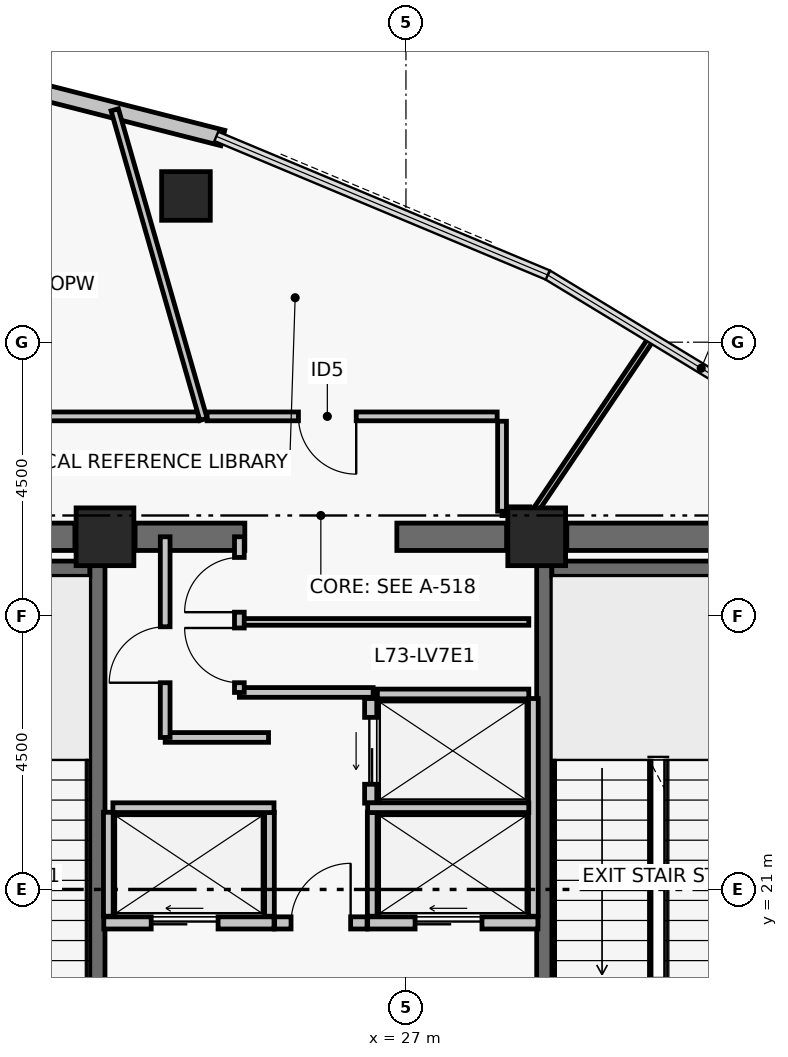
"""IFC4 building model, lengths in metres.
Left out: names, types, materials, properties, quantities, classifications, styles, units other than length and angle.
Written with IfcOpenShell. Run it as: python <this file> out.ifc"""

import sys

from ifc_helpers import new_model, si_unit, direction, frame, frame_2d, origin, origin_2d, place, context, subcontext, project, spatial, rectangle, hollow_rectangle, extrude, element, fill, save


model = new_model("IFC4")
c1 = context("Model", 3, precision=1e-05, world=origin(), true_north=direction((0.0, 1.0)))
c2 = subcontext(c1, "Body", "Model", "MODEL_VIEW")
j1 = project(units=[si_unit("LENGTHUNIT", "METRE"), si_unit("PLANEANGLEUNIT", "RADIAN")], contexts=[c1])
p1 = place(None, origin())
s1 = spatial("IfcSite", under=j1, at=p1, CompositionType="ELEMENT")
p2 = place(p1, origin())
s2 = spatial("IfcBuilding", under=s1, at=p2, CompositionType="ELEMENT")
p3 = place(p2, frame((0.0, 0.0, 288.06)))
s3 = spatial("IfcBuildingStorey", under=s2, at=p3, CompositionType="ELEMENT", Elevation=288.06)
for number, where, z_axis, x_axis in (
    (1, (22.05, 26.8, 0.0), (0.0, 0.0, 1.0), (1.0, 0.0, 0.0)),
    (2, (29.15, 26.8, 0.0), (0.0, 0.0, 1.0), (1.0, 0.0, 0.0)),
):
    element("IfcColumn", number, at=place(p3, frame(where, z_axis=z_axis, x_axis=x_axis)), inside=s3, PredefinedType="COLUMN", context=c2, shape_type="SweptSolid", body=[
        extrude(rectangle(XDim=0.95, YDim=0.95, at=origin_2d()), origin(), (0.0, 0.0, 1.0), 3.72),
    ])
p4 = place(p3, frame((18.295, 26.8, 0.0), z_axis=(0.0, 0.0, 1.0), x_axis=(1.0, 0.0, 0.0)))
e3 = element("IfcWall", 3, at=p4, inside=s3, PredefinedType="SHEAR", context=c2, shape_type="SweptSolid", body=[
    extrude(rectangle(XDim=3.26, YDim=0.45, at=frame_2d((1.63, 0.0))), origin(), (0.0, 0.0, 1.0), 3.5),
])
p5 = place(p3, frame((22.545, 26.8, 0.0), z_axis=(0.0, 0.0, 1.0), x_axis=(1.0, 0.0, 0.0)))
e4 = element("IfcWall", 4, at=p5, inside=s3, PredefinedType="SHEAR", context=c2, shape_type="SweptSolid", body=[
    extrude(rectangle(XDim=1.805, YDim=0.45, at=frame_2d((0.903, 0.0))), origin(), (0.0, 0.0, 1.0), 3.5),
])
p6 = place(p3, frame((26.85, 26.8, 0.0), z_axis=(0.0, 0.0, 1.0), x_axis=(1.0, 0.0, 0.0)))
e5 = element("IfcWall", 5, at=p6, inside=s3, PredefinedType="SHEAR", context=c2, shape_type="SweptSolid", body=[
    extrude(rectangle(XDim=1.805, YDim=0.45, at=frame_2d((0.902, 0.0))), origin(), (0.0, 0.0, 1.0), 3.5),
])
p7 = place(p3, frame((29.645, 26.8, 0.0), z_axis=(0.0, 0.0, 1.0), x_axis=(1.0, 0.0, 0.0)))
e6 = element("IfcWall", 6, at=p7, inside=s3, PredefinedType="SHEAR", context=c2, shape_type="SweptSolid", body=[
    extrude(rectangle(XDim=3.26, YDim=0.45, at=frame_2d((1.63, 0.0))), origin(), (0.0, 0.0, 1.0), 3.5),
])
p8 = place(p3, frame((21.925, 17.6, 0.0), z_axis=(0.0, 0.0, 1.0), x_axis=(0.0, 1.0, 0.0)))
e7 = element("IfcWall", 7, at=p8, inside=s3, PredefinedType="SHEAR", context=c2, shape_type="SweptSolid", body=[
    extrude(rectangle(XDim=8.8, YDim=0.25, at=frame_2d((4.4, 0.0))), origin(), (0.0, 0.0, 1.0), 3.5),
])
p9 = place(p8, frame((0.35, 0.0, 0.0)))
e8 = element("IfcOpeningElement", 8, at=p9, cuts=e7, PredefinedType="OPENING", context=c2, shape_type="SweptSolid", body=[
    extrude(rectangle(XDim=1.05, YDim=2.08, at=frame_2d((0.525, 1.04))), frame((0.0, 0.135, 0.0), z_axis=(0.0, -1.0, 0.0), x_axis=(1.0, 0.0, 0.0)), (0.0, 0.0, 1.0), 0.27),
])
p10 = place(p3, frame((18.3, 26.275, 0.0), z_axis=(0.0, 0.0, 1.0), x_axis=(1.0, 0.0, 0.0)))
e9 = element("IfcWall", 9, at=p10, inside=s3, PredefinedType="SHEAR", context=c2, shape_type="SweptSolid", body=[
    extrude(rectangle(XDim=3.5, YDim=0.25, at=frame_2d((1.75, 0.0))), origin(), (0.0, 0.0, 1.0), 3.5),
])
p11 = place(p3, frame((29.275, 17.6, 0.0), z_axis=(0.0, 0.0, 1.0), x_axis=(0.0, 1.0, 0.0)))
e10 = element("IfcWall", 10, at=p11, inside=s3, PredefinedType="SHEAR", context=c2, shape_type="SweptSolid", body=[
    extrude(rectangle(XDim=8.8, YDim=0.25, at=frame_2d((4.4, 0.0))), origin(), (0.0, 0.0, 1.0), 3.5),
])
p12 = place(p11, frame((0.35, 0.0, 0.0)))
e11 = element("IfcOpeningElement", 11, at=p12, cuts=e10, PredefinedType="OPENING", context=c2, shape_type="SweptSolid", body=[
    extrude(rectangle(XDim=1.05, YDim=2.08, at=frame_2d((0.525, 1.04))), frame((0.0, 0.135, 0.0), z_axis=(0.0, -1.0, 0.0), x_axis=(1.0, 0.0, 0.0)), (0.0, 0.0, 1.0), 0.27),
])
p13 = place(p3, frame((29.4, 26.275, 0.0), z_axis=(0.0, 0.0, 1.0), x_axis=(1.0, 0.0, 0.0)))
e12 = element("IfcWall", 12, at=p13, inside=s3, PredefinedType="SHEAR", context=c2, shape_type="SweptSolid", body=[
    extrude(rectangle(XDim=3.5, YDim=0.25, at=frame_2d((1.75, 0.0))), origin(), (0.0, 0.0, 1.0), 3.5),
])
p14 = place(p3, frame((23.382, 32.405, 0.0), z_axis=(0.0, 0.0, 1.0), x_axis=(1.0, 0.0, 0.0)))
e13 = element("IfcColumn", 13, at=p14, inside=s3, PredefinedType="COLUMN", context=c2, shape_type="SweptSolid", body=[
    extrude(hollow_rectangle(XDim=0.8, YDim=0.8, WallThickness=0.035, at=origin_2d()), origin(), (0.0, 0.0, 1.0), 3.72),
])
p15 = place(p3, frame((18.024, 34.879, 0.0), z_axis=(0.0, 0.0, 1.0), x_axis=(0.968988278672, -0.247106689096, 0.0)))
e14 = element("IfcWall", 14, at=p15, inside=s3, PredefinedType="PARTITIONING", context=c2, shape_type="SweptSolid", body=[
    extrude(rectangle(XDim=6.154, YDim=0.26, at=frame_2d((3.077, 0.0))), origin(), (0.0, 0.0, 1.0), 3.5),
])
p16 = place(p3, frame((24.84, 20.45, 0.0), z_axis=(0.0, 0.0, 1.0), x_axis=(1.0, 0.0, 0.0)))
e15 = element("IfcWall", 15, at=p16, inside=s3, PredefinedType="PARTITIONING", context=c2, shape_type="SweptSolid", body=[
    extrude(rectangle(XDim=1.52, YDim=0.2, at=frame_2d((0.76, 0.0))), origin(), (0.0, 0.0, 1.0), 3.5),
])
p17 = place(p16, frame((0.27, 0.0, 0.0)))
e16 = element("IfcOpeningElement", 16, at=p17, cuts=e15, PredefinedType="OPENING", context=c2, shape_type="SweptSolid", body=[
    extrude(rectangle(XDim=0.98, YDim=2.06, at=frame_2d((0.49, 1.03))), frame((0.0, 0.11, 0.0), z_axis=(0.0, -1.0, 0.0), x_axis=(1.0, 0.0, 0.0)), (0.0, 0.0, 1.0), 0.22),
])
p18 = place(p3, frame((22.03, 20.45, 0.0), z_axis=(0.0, 0.0, 1.0), x_axis=(1.0, 0.0, 0.0)))
e17 = element("IfcWall", 17, at=p18, inside=s3, PredefinedType="PARTITIONING", context=c2, shape_type="SweptSolid", body=[
    extrude(rectangle(XDim=2.8, YDim=0.2, at=frame_2d((1.4, 0.0))), origin(), (0.0, 0.0, 1.0), 3.5),
])
p19 = place(p18, frame((0.78, 0.0, 0.0)))
e18 = element("IfcOpeningElement", 18, at=p19, cuts=e17, PredefinedType="OPENING", context=c2, shape_type="SweptSolid", body=[
    extrude(rectangle(XDim=1.1, YDim=2.08, at=frame_2d((0.55, 1.04))), frame((0.0, 0.11, 0.0), z_axis=(0.0, -1.0, 0.0), x_axis=(1.0, 0.0, 0.0)), (0.0, 0.0, 1.0), 0.22),
])
p20 = place(p3, frame((26.37, 20.45, 0.0), z_axis=(0.0, 0.0, 1.0), x_axis=(1.0, 0.0, 0.0)))
e19 = element("IfcWall", 19, at=p20, inside=s3, PredefinedType="PARTITIONING", context=c2, shape_type="SweptSolid", body=[
    extrude(rectangle(XDim=2.8, YDim=0.2, at=frame_2d((1.4, 0.0))), origin(), (0.0, 0.0, 1.0), 3.5),
])
p21 = place(p20, frame((0.78, 0.0, 0.0)))
e20 = element("IfcOpeningElement", 20, at=p21, cuts=e19, PredefinedType="OPENING", context=c2, shape_type="SweptSolid", body=[
    extrude(rectangle(XDim=1.1, YDim=2.08, at=frame_2d((0.55, 1.04))), frame((0.0, 0.11, 0.0), z_axis=(0.0, -1.0, 0.0), x_axis=(1.0, 0.0, 0.0)), (0.0, 0.0, 1.0), 0.22),
])
p22 = place(p3, frame((26.42, 22.42, 0.0), z_axis=(0.0, 0.0, 1.0), x_axis=(0.0, 1.0, 0.0)))
e21 = element("IfcWall", 21, at=p22, inside=s3, PredefinedType="PARTITIONING", context=c2, shape_type="SweptSolid", body=[
    extrude(rectangle(XDim=1.72, YDim=0.2, at=frame_2d((0.86, 0.0))), origin(), (0.0, 0.0, 1.0), 3.5),
])
p23 = place(p22, frame((0.31, 0.0, 0.0)))
e22 = element("IfcOpeningElement", 22, at=p23, cuts=e21, PredefinedType="OPENING", context=c2, shape_type="SweptSolid", body=[
    extrude(rectangle(XDim=1.1, YDim=2.08, at=frame_2d((0.55, 1.04))), frame((0.0, 0.11, 0.0), z_axis=(0.0, -1.0, 0.0), x_axis=(1.0, 0.0, 0.0)), (0.0, 0.0, 1.0), 0.22),
])
for number, where, z_axis, x_axis in (
    (23, (22.105, 20.56, 0.0), (0.0, 0.0, 1.0), (0.0, 1.0, 0.0)),
    (24, (24.755, 20.56, 0.0), (0.0, 0.0, 1.0), (0.0, 1.0, 0.0)),
):
    element("IfcWall", number, at=place(p3, frame(where, z_axis=z_axis, x_axis=x_axis)), inside=s3, PredefinedType="PARTITIONING", context=c2, shape_type="SweptSolid", body=[
        extrude(rectangle(XDim=1.71, YDim=0.16, at=frame_2d((0.855, 0.0))), origin(), (0.0, 0.0, 1.0), 3.5),
    ])
p24 = place(p3, frame((22.18, 22.345, 0.0), z_axis=(0.0, 0.0, 1.0), x_axis=(1.0, 0.0, 0.0)))
e25 = element("IfcWall", 25, at=p24, inside=s3, PredefinedType="PARTITIONING", context=c2, shape_type="SweptSolid", body=[
    extrude(rectangle(XDim=2.65, YDim=0.16, at=frame_2d((1.325, 0.0))), origin(), (0.0, 0.0, 1.0), 3.5),
])
p25 = place(p3, frame((29.095, 20.56, 0.0), z_axis=(0.0, 0.0, 1.0), x_axis=(0.0, 1.0, 0.0)))
e26 = element("IfcWall", 26, at=p25, inside=s3, PredefinedType="PARTITIONING", context=c2, shape_type="SweptSolid", body=[
    extrude(rectangle(XDim=3.58, YDim=0.16, at=frame_2d((1.79, 0.0))), origin(), (0.0, 0.0, 1.0), 3.5),
])
p26 = place(p3, frame((26.445, 20.56, 0.0), z_axis=(0.0, 0.0, 1.0), x_axis=(0.0, 1.0, 0.0)))
e27 = element("IfcWall", 27, at=p26, inside=s3, PredefinedType="PARTITIONING", context=c2, shape_type="SweptSolid", body=[
    extrude(rectangle(XDim=1.71, YDim=0.16, at=frame_2d((0.855, 0.0))), origin(), (0.0, 0.0, 1.0), 3.5),
])
p27 = place(p3, frame((26.37, 22.345, 0.0), z_axis=(0.0, 0.0, 1.0), x_axis=(1.0, 0.0, 0.0)))
e28 = element("IfcWall", 28, at=p27, inside=s3, PredefinedType="PARTITIONING", context=c2, shape_type="SweptSolid", body=[
    extrude(rectangle(XDim=2.65, YDim=0.16, at=frame_2d((1.325, 0.0))), origin(), (0.0, 0.0, 1.0), 3.5),
])
p28 = place(p3, frame((26.53, 24.215, 0.0), z_axis=(0.0, 0.0, 1.0), x_axis=(1.0, 0.0, 0.0)))
e29 = element("IfcWall", 29, at=p28, inside=s3, PredefinedType="PARTITIONING", context=c2, shape_type="SweptSolid", body=[
    extrude(rectangle(XDim=2.49, YDim=0.16, at=frame_2d((1.245, 0.0))), origin(), (0.0, 0.0, 1.0), 3.5),
])
p29 = place(p3, frame((23.04, 23.5, 0.0), z_axis=(0.0, 0.0, 1.0), x_axis=(1.0, 0.0, 0.0)))
e30 = element("IfcWall", 30, at=p29, inside=s3, PredefinedType="PARTITIONING", context=c2, shape_type="SweptSolid", body=[
    extrude(rectangle(XDim=1.7, YDim=0.16, at=frame_2d((0.85, 0.0))), origin(), (0.0, 0.0, 1.0), 3.5),
])
p30 = place(p3, frame((23.04, 23.5, 0.0), z_axis=(0.0, 0.0, 1.0), x_axis=(0.0, 1.0, 0.0)))
e31 = element("IfcWall", 31, at=p30, inside=s3, PredefinedType="PARTITIONING", context=c2, shape_type="SweptSolid", body=[
    extrude(rectangle(XDim=3.3, YDim=0.16, at=frame_2d((1.65, 0.0))), origin(), (0.0, 0.0, 1.0), 2.63),
])
p31 = place(p30, frame((0.9, 0.0, 0.0)))
e32 = element("IfcOpeningElement", 32, at=p31, cuts=e31, PredefinedType="OPENING", context=c2, shape_type="SweptSolid", body=[
    extrude(rectangle(XDim=0.92, YDim=2.05, at=frame_2d((0.46, 1.025))), frame((0.0, 0.09, 0.0), z_axis=(0.0, -1.0, 0.0), x_axis=(1.0, 0.0, 0.0)), (0.0, 0.0, 1.0), 0.18),
])
p32 = place(p3, frame((24.26, 24.24, 0.0), z_axis=(0.0, 0.0, 1.0), x_axis=(1.0, 0.0, 0.0)))
e33 = element("IfcWall", 33, at=p32, inside=s3, PredefinedType="PARTITIONING", context=c2, shape_type="SweptSolid", body=[
    extrude(rectangle(XDim=2.2, YDim=0.16, at=frame_2d((1.1, 0.0))), origin(), (0.0, 0.0, 1.0), 3.5),
])
p33 = place(p3, frame((24.26, 25.4, 0.0), z_axis=(0.0, 0.0, 1.0), x_axis=(1.0, 0.0, 0.0)))
e34 = element("IfcWall", 34, at=p33, inside=s3, PredefinedType="PARTITIONING", context=c2, shape_type="SweptSolid", body=[
    extrude(rectangle(XDim=4.76, YDim=0.11, at=frame_2d((2.38, 0.0))), origin(), (0.0, 0.0, 1.0), 3.5),
])
p34 = place(p3, frame((24.26, 24.24, 0.0), z_axis=(0.0, 0.0, 1.0), x_axis=(0.0, 1.0, 0.0)))
e35 = element("IfcWall", 35, at=p34, inside=s3, PredefinedType="PARTITIONING", context=c2, shape_type="SweptSolid", body=[
    extrude(rectangle(XDim=2.56, YDim=0.16, at=frame_2d((1.28, 0.0))), origin(), (0.0, 0.0, 1.0), 2.63),
])
p35 = place(p34, frame((0.16, 0.0, 0.0)))
e36 = element("IfcOpeningElement", 36, at=p35, cuts=e35, PredefinedType="OPENING", context=c2, shape_type="SweptSolid", body=[
    extrude(rectangle(XDim=0.9, YDim=2.02, at=frame_2d((0.45, 1.01))), frame((0.0, 0.09, 0.0), z_axis=(0.0, -1.0, 0.0), x_axis=(1.0, 0.0, 0.0)), (0.0, 0.0, 1.0), 0.18),
])
p36 = place(p34, frame((1.32, 0.0, 0.0)))
e37 = element("IfcOpeningElement", 37, at=p36, cuts=e35, PredefinedType="OPENING", context=c2, shape_type="SweptSolid", body=[
    extrude(rectangle(XDim=0.9, YDim=2.02, at=frame_2d((0.45, 1.01))), frame((0.0, 0.09, 0.0), z_axis=(0.0, -1.0, 0.0), x_axis=(1.0, 0.0, 0.0)), (0.0, 0.0, 1.0), 0.18),
])
p37 = place(p3, frame((29.037, 27.22, 0.0), z_axis=(0.0, 0.0, 1.0), x_axis=(-1.0, 0.0, 0.0)))
e38 = element("IfcWall", 38, at=p37, inside=s3, PredefinedType="PARTITIONING", context=c2, shape_type="SweptSolid", body=[
    extrude(rectangle(XDim=0.457, YDim=0.145, at=frame_2d((0.228, 0.0))), origin(), (0.0, 0.0, 1.0), 2.63),
])
p38 = place(p3, frame((28.58, 27.22, 0.0), z_axis=(0.0, 0.0, 1.0), x_axis=(0.0, 1.0, 0.0)))
e39 = element("IfcWall", 39, at=p38, inside=s3, PredefinedType="PARTITIONING", context=c2, shape_type="SweptSolid", body=[
    extrude(rectangle(XDim=1.48, YDim=0.145, at=frame_2d((0.74, 0.0))), origin(), (0.0, 0.0, 1.0), 2.63),
])
p39 = place(p3, frame((28.5, 28.78, 0.0), z_axis=(0.0, 0.0, 1.0), x_axis=(-1.0, 0.0, 0.0)))
e40 = element("IfcWall", 40, at=p39, inside=s3, PredefinedType="PARTITIONING", context=c2, shape_type="SweptSolid", body=[
    extrude(rectangle(XDim=4.771, YDim=0.145, at=frame_2d((2.386, 0.0))), origin(), (0.0, 0.0, 1.0), 3.5),
])
p40 = place(p39, frame((2.318, 0.0, 0.0)))
e41 = element("IfcOpeningElement", 41, at=p40, cuts=e40, PredefinedType="OPENING", context=c2, shape_type="SweptSolid", body=[
    extrude(rectangle(XDim=0.95, YDim=2.06, at=frame_2d((0.475, 1.03))), frame((0.0, 0.083, 0.0), z_axis=(0.0, -1.0, 0.0), x_axis=(1.0, 0.0, 0.0)), (0.0, 0.0, 1.0), 0.165),
])
p41 = place(p3, frame((23.583, 28.78, 0.0), z_axis=(0.0, 0.0, 1.0), x_axis=(-1.0, 0.0, 0.0)))
e42 = element("IfcWall", 42, at=p41, inside=s3, PredefinedType="PARTITIONING", context=c2, shape_type="SweptSolid", body=[
    extrude(rectangle(XDim=6.043, YDim=0.145, at=frame_2d((3.021, 0.0))), origin(), (0.0, 0.0, 1.0), 2.83),
])
p42 = place(p3, frame((29.087, 27.17, 0.0), z_axis=(0.0, 0.0, 1.0), x_axis=(0.559194012427, 0.829036824554, 0.0)))
e43 = element("IfcWall", 43, at=p42, inside=s3, PredefinedType="PARTITIONING", context=c2, shape_type="SweptSolid", body=[
    extrude(rectangle(XDim=3.504, YDim=0.095, at=frame_2d((1.752, 0.0))), origin(), (0.0, 0.0, 1.0), 2.63),
])
p43 = place(p3, frame((23.67, 28.73, 0.0), z_axis=(0.0, 0.0, 1.0), x_axis=(-0.275646373744, 0.961259110044, 0.0)))
e44 = element("IfcWall", 44, at=p43, inside=s3, PredefinedType="PARTITIONING", context=c2, shape_type="SweptSolid", body=[
    extrude(rectangle(XDim=5.296, YDim=0.125, at=frame_2d((2.648, 0.0))), origin(), (0.0, 0.0, 1.0), 2.83),
])
p44 = place(p17, origin())
e45 = element("IfcDoor", 45, at=p44, inside=s3, OperationType="SINGLE_SWING_RIGHT", PredefinedType="DOOR", context=c2, shape_type="SweptSolid", body=[
    extrude(rectangle(XDim=0.98, YDim=2.06, at=frame_2d((0.49, 1.03))), frame((0.0, 0.025, 0.0), z_axis=(0.0, -1.0, 0.0), x_axis=(1.0, 0.0, 0.0)), (0.0, 0.0, 1.0), 0.05),
])
fill(e16, e45)
p45 = place(p19, origin())
e46 = element("IfcDoor", 46, at=p45, inside=s3, OperationType="DOUBLE_DOOR_SLIDING", PredefinedType="DOOR", context=c2, shape_type="SweptSolid", body=[
    extrude(rectangle(XDim=1.1, YDim=2.08, at=frame_2d((0.55, 1.04))), frame((0.0, 0.025, 0.0), z_axis=(0.0, -1.0, 0.0), x_axis=(1.0, 0.0, 0.0)), (0.0, 0.0, 1.0), 0.05),
])
fill(e18, e46)
p46 = place(p21, origin())
e47 = element("IfcDoor", 47, at=p46, inside=s3, OperationType="DOUBLE_DOOR_SLIDING", PredefinedType="DOOR", context=c2, shape_type="SweptSolid", body=[
    extrude(rectangle(XDim=1.1, YDim=2.08, at=frame_2d((0.55, 1.04))), frame((0.0, 0.025, 0.0), z_axis=(0.0, -1.0, 0.0), x_axis=(1.0, 0.0, 0.0)), (0.0, 0.0, 1.0), 0.05),
])
fill(e20, e47)
p47 = place(p23, origin())
e48 = element("IfcDoor", 48, at=p47, inside=s3, OperationType="DOUBLE_DOOR_SLIDING", PredefinedType="DOOR", context=c2, shape_type="SweptSolid", body=[
    extrude(rectangle(XDim=1.1, YDim=2.08, at=frame_2d((0.55, 1.04))), frame((0.0, 0.025, 0.0), z_axis=(0.0, -1.0, 0.0), x_axis=(1.0, 0.0, 0.0)), (0.0, 0.0, 1.0), 0.05),
])
fill(e22, e48)
p48 = place(p31, origin())
e49 = element("IfcDoor", 49, at=p48, inside=s3, OperationType="SINGLE_SWING_LEFT", PredefinedType="DOOR", context=c2, shape_type="SweptSolid", body=[
    extrude(rectangle(XDim=0.92, YDim=2.05, at=frame_2d((0.46, 1.025))), frame((0.0, 0.025, 0.0), z_axis=(0.0, -1.0, 0.0), x_axis=(1.0, 0.0, 0.0)), (0.0, 0.0, 1.0), 0.05),
])
fill(e32, e49)
p49 = place(p35, origin())
e50 = element("IfcDoor", 50, at=p49, inside=s3, OperationType="SINGLE_SWING_RIGHT", PredefinedType="DOOR", context=c2, shape_type="SweptSolid", body=[
    extrude(rectangle(XDim=0.9, YDim=2.02, at=frame_2d((0.45, 1.01))), frame((0.0, 0.025, 0.0), z_axis=(0.0, -1.0, 0.0), x_axis=(1.0, 0.0, 0.0)), (0.0, 0.0, 1.0), 0.05),
])
fill(e36, e50)
p50 = place(p36, origin())
e51 = element("IfcDoor", 51, at=p50, inside=s3, OperationType="SINGLE_SWING_LEFT", PredefinedType="DOOR", context=c2, shape_type="SweptSolid", body=[
    extrude(rectangle(XDim=0.9, YDim=2.02, at=frame_2d((0.45, 1.01))), frame((0.0, 0.025, 0.0), z_axis=(0.0, -1.0, 0.0), x_axis=(1.0, 0.0, 0.0)), (0.0, 0.0, 1.0), 0.05),
])
fill(e37, e51)
p51 = place(p40, origin())
e52 = element("IfcDoor", 52, at=p51, inside=s3, OperationType="SINGLE_SWING_LEFT", PredefinedType="DOOR", context=c2, shape_type="SweptSolid", body=[
    extrude(rectangle(XDim=0.95, YDim=2.06, at=frame_2d((0.475, 1.03))), frame((0.0, 0.025, 0.0), z_axis=(0.0, -1.0, 0.0), x_axis=(1.0, 0.0, 0.0)), (0.0, 0.0, 1.0), 0.05),
])
fill(e41, e52)
save(model, sys.argv[1])
